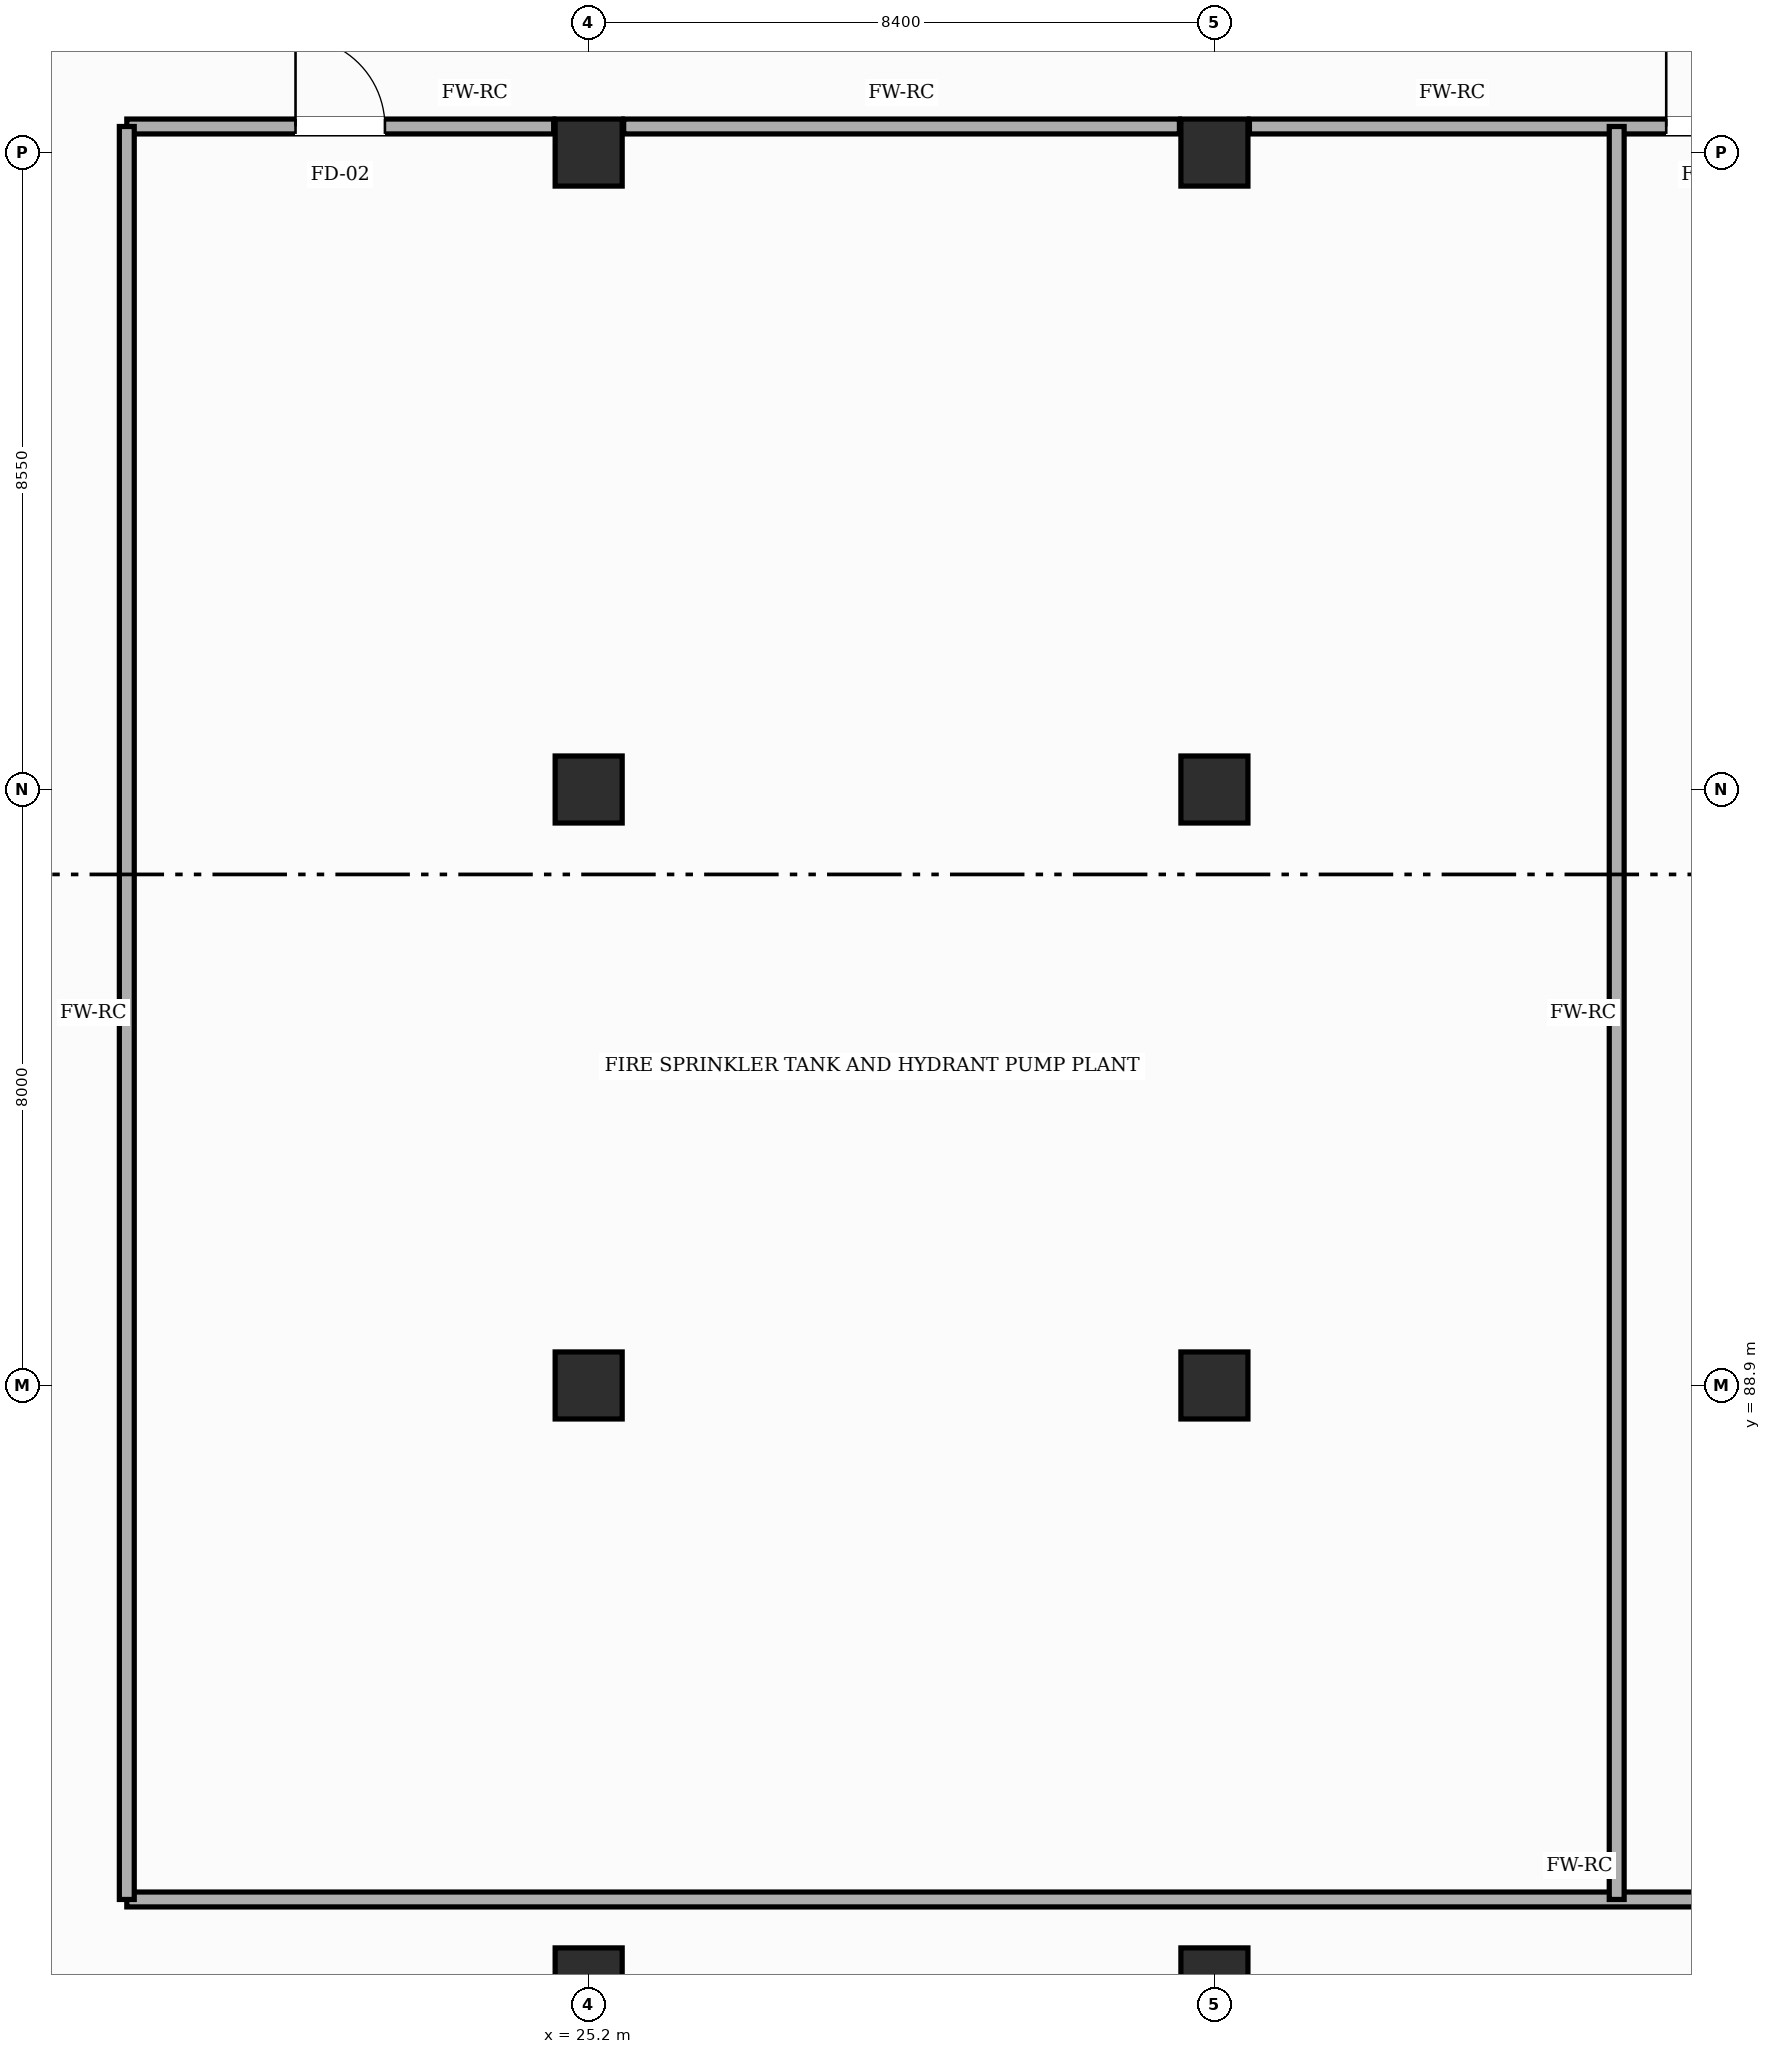
"""IFC4 building model, lengths in metres.
Left out: names, types, materials, properties, quantities, classifications, styles, units other than length and angle.
Written with IfcOpenShell. Run it as: python <this file> out.ifc"""

import sys

from ifc_helpers import new_model, si_unit, direction, frame, frame_2d, origin, origin_2d, place, context, subcontext, project, spatial, rectangle, extrude, element, fill, save


model = new_model("IFC4")
c1 = context("Model", 3, precision=1e-05, world=origin(), true_north=direction((0.0, 1.0)))
c2 = subcontext(c1, "Body", "Model", "MODEL_VIEW")
j1 = project(units=[si_unit("LENGTHUNIT", "METRE"), si_unit("PLANEANGLEUNIT", "RADIAN")], contexts=[c1])
p1 = place(None, origin())
s1 = spatial("IfcSite", under=j1, at=p1, CompositionType="ELEMENT")
p2 = place(p1, origin())
s2 = spatial("IfcBuilding", under=s1, at=p2, CompositionType="ELEMENT")
p3 = place(p2, frame((0.0, 0.0, -5.4)))
s3 = spatial("IfcBuildingStorey", under=s2, at=p3, CompositionType="ELEMENT", Elevation=-5.4)
for number, where, z_axis, x_axis in (
    (1, (25.2, 80.9, 0.0), (0.0, 0.0, 1.0), (1.0, 0.0, 0.0)),
    (2, (25.2, 88.9, 0.0), (0.0, 0.0, 1.0), (1.0, 0.0, 0.0)),
    (3, (25.2, 96.9, 0.0), (0.0, 0.0, 1.0), (1.0, 0.0, 0.0)),
    (4, (25.2, 105.45, 0.0), (0.0, 0.0, 1.0), (1.0, 0.0, 0.0)),
    (5, (33.6, 80.9, 0.0), (0.0, 0.0, 1.0), (1.0, 0.0, 0.0)),
    (6, (33.6, 88.9, 0.0), (0.0, 0.0, 1.0), (1.0, 0.0, 0.0)),
    (7, (33.6, 96.9, 0.0), (0.0, 0.0, 1.0), (1.0, 0.0, 0.0)),
    (8, (33.6, 105.45, 0.0), (0.0, 0.0, 1.0), (1.0, 0.0, 0.0)),
):
    element("IfcColumn", number, at=place(p3, frame(where, z_axis=z_axis, x_axis=x_axis)), inside=s3, PredefinedType="COLUMN", context=c2, shape_type="SweptSolid", body=[
        extrude(rectangle(XDim=0.9, YDim=0.9, at=origin_2d()), origin(), (0.0, 0.0, 1.0), 5.12),
    ])
p4 = place(p3, frame((19.0, 82.0, 0.0), z_axis=(0.0, 0.0, 1.0), x_axis=(1.0, 0.0, 0.0)))
e9 = element("IfcWall", 9, at=p4, inside=s3, PredefinedType="SOLIDWALL", context=c2, shape_type="SweptSolid", body=[
    extrude(rectangle(XDim=40.0, YDim=0.2, at=frame_2d((20.0, 0.0))), origin(), (0.0, 0.0, 1.0), 5.105),
])
p5 = place(p3, frame((19.0, 105.8, 0.0), z_axis=(0.0, 0.0, 1.0), x_axis=(1.0, 0.0, 0.0)))
e10 = element("IfcWall", 10, at=p5, inside=s3, PredefinedType="SOLIDWALL", context=c2, shape_type="SweptSolid", body=[
    extrude(rectangle(XDim=5.73, YDim=0.2, at=frame_2d((2.865, 0.0))), origin(), (0.0, 0.0, 1.0), 4.395),
])
p6 = place(p5, frame((2.265, 0.0, 0.0)))
e11 = element("IfcOpeningElement", 11, at=p6, cuts=e10, PredefinedType="OPENING", context=c2, shape_type="SweptSolid", body=[
    extrude(rectangle(XDim=1.2, YDim=2.2, at=frame_2d((0.6, 1.1))), frame((0.0, 0.11, 0.0), z_axis=(0.0, -1.0, 0.0), x_axis=(1.0, 0.0, 0.0)), (0.0, 0.0, 1.0), 0.22),
])
p7 = place(p3, frame((25.67, 105.8, 0.0), z_axis=(0.0, 0.0, 1.0), x_axis=(1.0, 0.0, 0.0)))
e12 = element("IfcWall", 12, at=p7, inside=s3, PredefinedType="SOLIDWALL", context=c2, shape_type="SweptSolid", body=[
    extrude(rectangle(XDim=7.46, YDim=0.2, at=frame_2d((3.73, 0.0))), origin(), (0.0, 0.0, 1.0), 4.395),
])
p8 = place(p3, frame((34.07, 105.8, 0.0), z_axis=(0.0, 0.0, 1.0), x_axis=(1.0, 0.0, 0.0)))
e13 = element("IfcWall", 13, at=p8, inside=s3, PredefinedType="SOLIDWALL", context=c2, shape_type="SweptSolid", body=[
    extrude(rectangle(XDim=7.46, YDim=0.2, at=frame_2d((3.73, 0.0))), origin(), (0.0, 0.0, 1.0), 4.395),
])
p9 = place(p8, frame((5.595, 0.0, 0.0)))
e14 = element("IfcOpeningElement", 14, at=p9, cuts=e13, PredefinedType="OPENING", context=c2, shape_type="SweptSolid", body=[
    extrude(rectangle(XDim=1.2, YDim=2.2, at=frame_2d((0.6, 1.1))), frame((0.0, 0.11, 0.0), z_axis=(0.0, -1.0, 0.0), x_axis=(1.0, 0.0, 0.0)), (0.0, 0.0, 1.0), 0.22),
])
for number, where, z_axis, x_axis in (
    (15, (19.0, 82.0, 0.0), (0.0, 0.0, 1.0), (0.0, 1.0, 0.0)),
    (16, (39.0, 82.0, 0.0), (0.0, 0.0, 1.0), (0.0, 1.0, 0.0)),
):
    element("IfcWall", number, at=place(p3, frame(where, z_axis=z_axis, x_axis=x_axis)), inside=s3, PredefinedType="SOLIDWALL", context=c2, shape_type="SweptSolid", body=[
        extrude(rectangle(XDim=23.8, YDim=0.2, at=frame_2d((11.9, 0.0))), origin(), (0.0, 0.0, 1.0), 5.105),
    ])
p10 = place(p6, origin())
e17 = element("IfcDoor", 17, at=p10, inside=s3, OperationType="SINGLE_SWING_LEFT", PredefinedType="DOOR", context=c2, shape_type="SweptSolid", body=[
    extrude(rectangle(XDim=1.2, YDim=2.2, at=frame_2d((0.6, 1.1))), frame((0.0, 0.025, 0.0), z_axis=(0.0, -1.0, 0.0), x_axis=(1.0, 0.0, 0.0)), (0.0, 0.0, 1.0), 0.05),
])
fill(e11, e17)
p11 = place(p9, origin())
e18 = element("IfcDoor", 18, at=p11, inside=s3, OperationType="SINGLE_SWING_LEFT", PredefinedType="DOOR", context=c2, shape_type="SweptSolid", body=[
    extrude(rectangle(XDim=1.2, YDim=2.2, at=frame_2d((0.6, 1.1))), frame((0.0, 0.025, 0.0), z_axis=(0.0, -1.0, 0.0), x_axis=(1.0, 0.0, 0.0)), (0.0, 0.0, 1.0), 0.05),
])
fill(e14, e18)
save(model, sys.argv[1])
